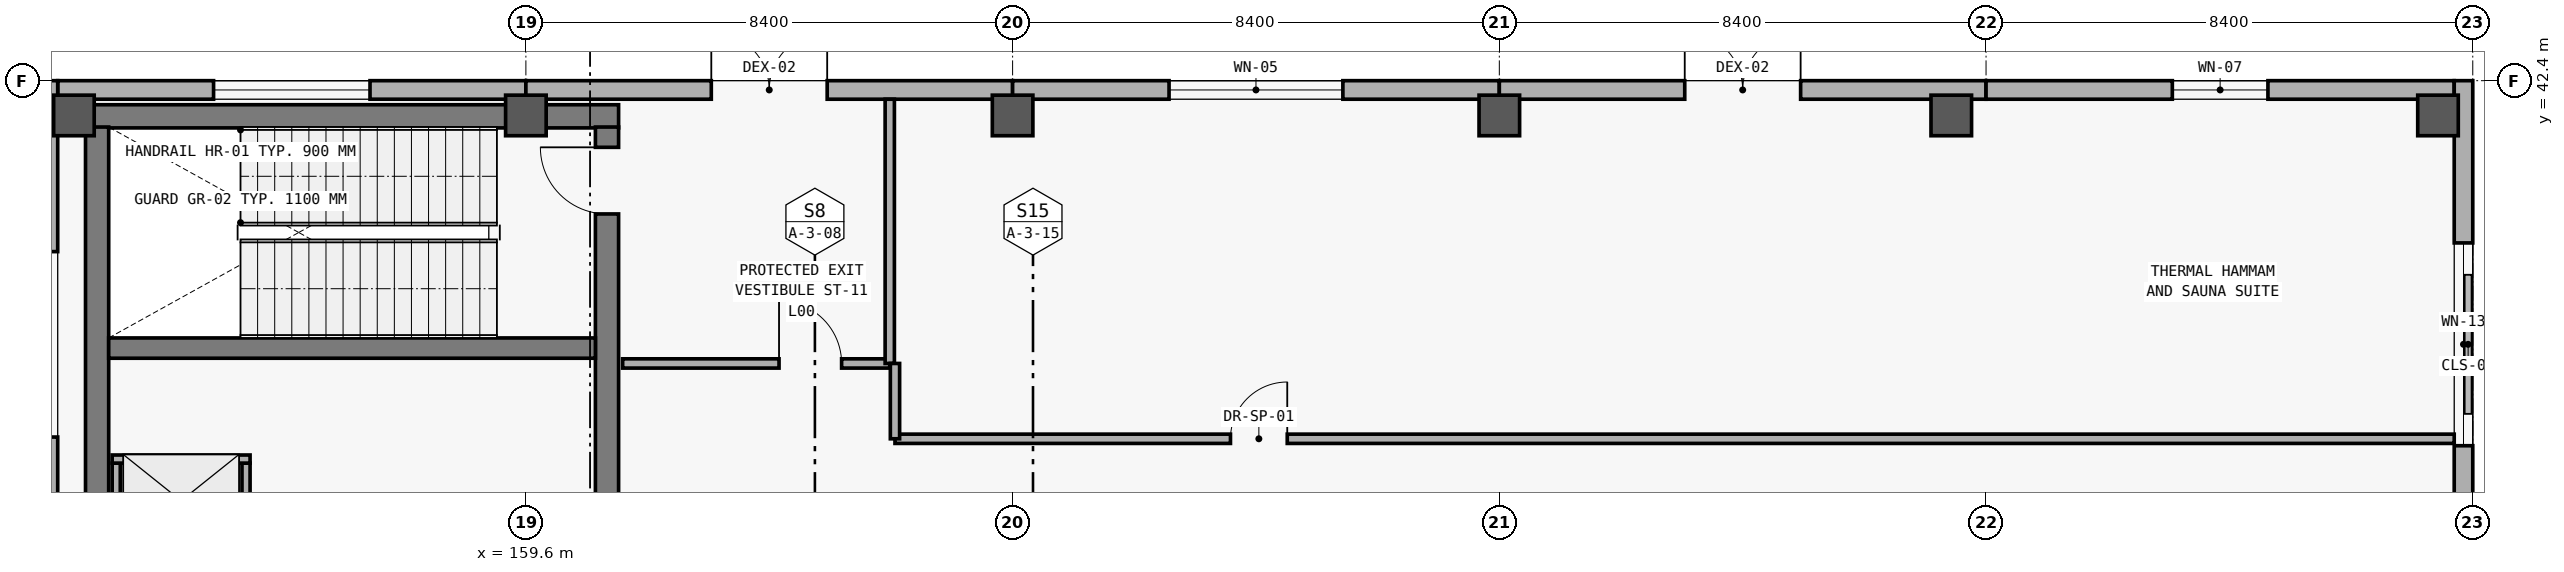
"""IFC4 building model, lengths in metres.
Left out: names, types, materials, properties, quantities, classifications, styles, units other than length and angle.
Written with IfcOpenShell. Run it as: python <this file> out.ifc"""

import sys

from ifc_helpers import new_model, si_unit, direction, frame, frame_2d, origin, origin_2d, place, context, subcontext, project, spatial, rectangle, extrude, element, fill, save


model = new_model("IFC4")
c1 = context("Model", 3, precision=1e-05, world=origin(), true_north=direction((0.0, 1.0)))
c2 = subcontext(c1, "Body", "Model", "MODEL_VIEW")
j1 = project(units=[si_unit("LENGTHUNIT", "METRE"), si_unit("PLANEANGLEUNIT", "RADIAN")], contexts=[c1])
p1 = place(None, origin())
s1 = spatial("IfcSite", under=j1, at=p1, CompositionType="ELEMENT")
p2 = place(p1, origin())
s2 = spatial("IfcBuilding", under=s1, at=p2, CompositionType="ELEMENT")
p3 = place(p2, origin())
s3 = spatial("IfcBuildingStorey", under=s2, at=p3, CompositionType="ELEMENT", Elevation=0.0)
for number, where, z_axis, x_axis in (
    (1, (151.8, 41.8, 0.0), (0.0, 0.0, 1.0), (1.0, 0.0, 0.0)),
    (2, (159.6, 41.8, 0.0), (0.0, 0.0, 1.0), (1.0, 0.0, 0.0)),
    (3, (168.0, 41.8, 0.0), (0.0, 0.0, 1.0), (1.0, 0.0, 0.0)),
    (4, (176.4, 41.8, 0.0), (0.0, 0.0, 1.0), (1.0, 0.0, 0.0)),
    (5, (184.2, 41.8, 0.0), (0.0, 0.0, 1.0), (1.0, 0.0, 0.0)),
    (6, (192.6, 41.8, 0.0), (0.0, 0.0, 1.0), (1.0, 0.0, 0.0)),
):
    element("IfcColumn", number, at=place(p3, frame(where, z_axis=z_axis, x_axis=x_axis)), inside=s3, PredefinedType="COLUMN", context=c2, shape_type="SweptSolid", body=[
        extrude(rectangle(XDim=0.7, YDim=0.7, at=origin_2d()), origin(), (0.0, 0.0, 1.0), 5.4),
    ])
p4 = place(p3, frame((151.52, 42.24, 0.0), z_axis=(0.0, 0.0, 1.0), x_axis=(1.0, 0.0, 0.0)))
e7 = element("IfcWall", 7, at=p4, inside=s3, PredefinedType="SOLIDWALL", context=c2, shape_type="SweptSolid", body=[
    extrude(rectangle(XDim=8.08, YDim=0.32, at=frame_2d((4.04, 0.0))), origin(), (0.0, 0.0, 1.0), 5.1),
])
p5 = place(p4, frame((2.69, 0.0, 0.9)))
e8 = element("IfcOpeningElement", 8, at=p5, cuts=e7, PredefinedType="OPENING", context=c2, shape_type="SweptSolid", body=[
    extrude(rectangle(XDim=2.7, YDim=1.85, at=frame_2d((1.35, 0.925))), frame((0.0, 0.17, 0.0), z_axis=(0.0, -1.0, 0.0), x_axis=(1.0, 0.0, 0.0)), (0.0, 0.0, 1.0), 0.34),
])
p6 = place(p3, frame((159.6, 42.24, 0.0), z_axis=(0.0, 0.0, 1.0), x_axis=(1.0, 0.0, 0.0)))
e9 = element("IfcWall", 9, at=p6, inside=s3, PredefinedType="SOLIDWALL", context=c2, shape_type="SweptSolid", body=[
    extrude(rectangle(XDim=8.4, YDim=0.32, at=frame_2d((4.2, 0.0))), origin(), (0.0, 0.0, 1.0), 5.1),
])
p7 = place(p6, frame((3.2, 0.0, 0.0)))
e10 = element("IfcOpeningElement", 10, at=p7, cuts=e9, PredefinedType="OPENING", context=c2, shape_type="SweptSolid", body=[
    extrude(rectangle(XDim=2.0, YDim=2.6, at=frame_2d((1.0, 1.3))), frame((0.0, 0.17, 0.0), z_axis=(0.0, -1.0, 0.0), x_axis=(1.0, 0.0, 0.0)), (0.0, 0.0, 1.0), 0.34),
])
p8 = place(p3, frame((168.0, 42.24, 0.0), z_axis=(0.0, 0.0, 1.0), x_axis=(1.0, 0.0, 0.0)))
e11 = element("IfcWall", 11, at=p8, inside=s3, PredefinedType="SOLIDWALL", context=c2, shape_type="SweptSolid", body=[
    extrude(rectangle(XDim=8.4, YDim=0.32, at=frame_2d((4.2, 0.0))), origin(), (0.0, 0.0, 1.0), 5.1),
])
p9 = place(p8, frame((2.7, 0.0, 0.9)))
e12 = element("IfcOpeningElement", 12, at=p9, cuts=e11, PredefinedType="OPENING", context=c2, shape_type="SweptSolid", body=[
    extrude(rectangle(XDim=3.0, YDim=1.9, at=frame_2d((1.5, 0.95))), frame((0.0, 0.17, 0.0), z_axis=(0.0, -1.0, 0.0), x_axis=(1.0, 0.0, 0.0)), (0.0, 0.0, 1.0), 0.34),
])
p10 = place(p3, frame((176.4, 42.24, 0.0), z_axis=(0.0, 0.0, 1.0), x_axis=(1.0, 0.0, 0.0)))
e13 = element("IfcWall", 13, at=p10, inside=s3, PredefinedType="SOLIDWALL", context=c2, shape_type="SweptSolid", body=[
    extrude(rectangle(XDim=8.4, YDim=0.32, at=frame_2d((4.2, 0.0))), origin(), (0.0, 0.0, 1.0), 5.1),
])
p11 = place(p10, frame((3.2, 0.0, 0.0)))
e14 = element("IfcOpeningElement", 14, at=p11, cuts=e13, PredefinedType="OPENING", context=c2, shape_type="SweptSolid", body=[
    extrude(rectangle(XDim=2.0, YDim=2.6, at=frame_2d((1.0, 1.3))), frame((0.0, 0.17, 0.0), z_axis=(0.0, -1.0, 0.0), x_axis=(1.0, 0.0, 0.0)), (0.0, 0.0, 1.0), 0.34),
])
p12 = place(p3, frame((184.8, 42.24, 0.0), z_axis=(0.0, 0.0, 1.0), x_axis=(1.0, 0.0, 0.0)))
e15 = element("IfcWall", 15, at=p12, inside=s3, PredefinedType="SOLIDWALL", context=c2, shape_type="SweptSolid", body=[
    extrude(rectangle(XDim=8.08, YDim=0.32, at=frame_2d((4.04, 0.0))), origin(), (0.0, 0.0, 1.0), 5.1),
])
p13 = place(p12, frame((3.215, 0.0, 0.9)))
e16 = element("IfcOpeningElement", 16, at=p13, cuts=e15, PredefinedType="OPENING", context=c2, shape_type="SweptSolid", body=[
    extrude(rectangle(XDim=1.65, YDim=1.75, at=frame_2d((0.825, 0.875))), frame((0.0, 0.17, 0.0), z_axis=(0.0, -1.0, 0.0), x_axis=(1.0, 0.0, 0.0)), (0.0, 0.0, 1.0), 0.34),
])
p14 = place(p3, frame((151.36, 33.3, 0.0), z_axis=(0.0, 0.0, 1.0), x_axis=(0.0, 1.0, 0.0)))
e17 = element("IfcWall", 17, at=p14, inside=s3, PredefinedType="SOLIDWALL", context=c2, shape_type="SweptSolid", body=[
    extrude(rectangle(XDim=9.1, YDim=0.32, at=frame_2d((4.55, 0.0))), origin(), (0.0, 0.0, 1.0), 5.1),
])
p15 = place(p14, frame((2.95, 0.0, 0.9)))
e18 = element("IfcOpeningElement", 18, at=p15, cuts=e17, PredefinedType="OPENING", context=c2, shape_type="SweptSolid", body=[
    extrude(rectangle(XDim=3.2, YDim=1.95, at=frame_2d((1.6, 0.975))), frame((0.0, 0.17, 0.0), z_axis=(0.0, -1.0, 0.0), x_axis=(1.0, 0.0, 0.0)), (0.0, 0.0, 1.0), 0.34),
])
p16 = place(p3, frame((193.04, 42.4, 0.0), z_axis=(0.0, 0.0, 1.0), x_axis=(0.0, -1.0, 0.0)))
e19 = element("IfcWall", 19, at=p16, inside=s3, PredefinedType="SOLIDWALL", context=c2, shape_type="SweptSolid", body=[
    extrude(rectangle(XDim=9.1, YDim=0.32, at=frame_2d((4.55, 0.0))), origin(), (0.0, 0.0, 1.0), 5.1),
])
p17 = place(p16, frame((2.8, 0.0, 0.9)))
e20 = element("IfcOpeningElement", 20, at=p17, cuts=e19, PredefinedType="OPENING", context=c2, shape_type="SweptSolid", body=[
    extrude(rectangle(XDim=3.5, YDim=2.0, at=frame_2d((1.75, 1.0))), frame((0.0, 0.17, 0.0), z_axis=(0.0, -1.0, 0.0), x_axis=(1.0, 0.0, 0.0)), (0.0, 0.0, 1.0), 0.34),
])
p18 = place(p3, frame((161.2, 41.785, 0.0), z_axis=(0.0, 0.0, 1.0), x_axis=(-1.0, 0.0, 0.0)))
e21 = element("IfcWall", 21, at=p18, inside=s3, PredefinedType="SHEAR", context=c2, shape_type="SweptSolid", body=[
    extrude(rectangle(XDim=9.2, YDim=0.4, at=frame_2d((4.6, 0.0))), origin(), (0.0, 0.0, 1.0), 5.08),
])
p19 = place(p3, frame((152.2, 41.6, 0.0), z_axis=(0.0, 0.0, 1.0), x_axis=(0.0, -1.0, 0.0)))
e22 = element("IfcWall", 22, at=p19, inside=s3, PredefinedType="SHEAR", context=c2, shape_type="SweptSolid", body=[
    extrude(rectangle(XDim=7.4, YDim=0.4, at=frame_2d((3.7, 0.0))), origin(), (0.0, 0.0, 1.0), 5.08),
])
p20 = place(p3, frame((161.0, 34.2, 0.0), z_axis=(0.0, 0.0, 1.0), x_axis=(0.0, 1.0, 0.0)))
e23 = element("IfcWall", 23, at=p20, inside=s3, PredefinedType="SHEAR", context=c2, shape_type="SweptSolid", body=[
    extrude(rectangle(XDim=7.4, YDim=0.4, at=frame_2d((3.7, 0.0))), origin(), (0.0, 0.0, 1.0), 5.08),
])
p21 = place(p20, frame((5.9, 0.0, 0.0)))
e24 = element("IfcOpeningElement", 24, at=p21, cuts=e23, PredefinedType="OPENING", context=c2, shape_type="SweptSolid", body=[
    extrude(rectangle(XDim=1.15, YDim=2.2, at=frame_2d((0.575, 1.1))), frame((0.0, 0.21, 0.0), z_axis=(0.0, -1.0, 0.0), x_axis=(1.0, 0.0, 0.0)), (0.0, 0.0, 1.0), 0.42),
])
p22 = place(p3, frame((152.4, 37.785, 0.0), z_axis=(0.0, 0.0, 1.0), x_axis=(1.0, 0.0, 0.0)))
e25 = element("IfcWall", 25, at=p22, inside=s3, PredefinedType="SHEAR", context=c2, shape_type="SweptSolid", body=[
    extrude(rectangle(XDim=8.4, YDim=0.35, at=frame_2d((4.2, 0.0))), origin(), (0.0, 0.0, 1.0), 5.08),
])
for number, where, z_axis, x_axis in (
    (26, (152.53, 34.2, 0.0), (0.0, 0.0, 1.0), (0.0, 1.0, 0.0)),
    (27, (154.77, 34.2, 0.0), (0.0, 0.0, 1.0), (0.0, 1.0, 0.0)),
):
    element("IfcWall", number, at=place(p3, frame(where, z_axis=z_axis, x_axis=x_axis)), inside=s3, PredefinedType="PARTITIONING", context=c2, shape_type="SweptSolid", body=[
        extrude(rectangle(XDim=1.6, YDim=0.14, at=frame_2d((0.8, 0.0))), origin(), (0.0, 0.0, 1.0), 4.23),
    ])
p23 = place(p3, frame((152.46, 35.87, 0.0), z_axis=(0.0, 0.0, 1.0), x_axis=(1.0, 0.0, 0.0)))
e28 = element("IfcWall", 28, at=p23, inside=s3, PredefinedType="PARTITIONING", context=c2, shape_type="SweptSolid", body=[
    extrude(rectangle(XDim=2.38, YDim=0.14, at=frame_2d((1.19, 0.0))), origin(), (0.0, 0.0, 1.0), 4.23),
])
p24 = place(p3, frame((161.27, 37.52, 0.0), z_axis=(0.0, 0.0, 1.0), x_axis=(1.0, 0.0, 0.0)))
e29 = element("IfcWall", 29, at=p24, inside=s3, PredefinedType="PARTITIONING", context=c2, shape_type="SweptSolid", body=[
    extrude(rectangle(XDim=4.61, YDim=0.16, at=frame_2d((2.305, 0.0))), origin(), (0.0, 0.0, 1.0), 4.18),
])
p25 = place(p24, frame((2.699, 0.0, 0.0)))
e30 = element("IfcOpeningElement", 30, at=p25, cuts=e29, PredefinedType="OPENING", context=c2, shape_type="SweptSolid", body=[
    extrude(rectangle(XDim=1.08, YDim=2.25, at=frame_2d((0.54, 1.125))), frame((0.0, 0.09, 0.0), z_axis=(0.0, -1.0, 0.0), x_axis=(1.0, 0.0, 0.0)), (0.0, 0.0, 1.0), 0.18),
])
p26 = place(p3, frame((165.97, 36.22, 0.0), z_axis=(0.0, 0.0, 1.0), x_axis=(1.0, 0.0, 0.0)))
e31 = element("IfcWall", 31, at=p26, inside=s3, PredefinedType="PARTITIONING", context=c2, shape_type="SweptSolid", body=[
    extrude(rectangle(XDim=26.91, YDim=0.16, at=frame_2d((13.455, 0.0))), origin(), (0.0, 0.0, 1.0), 4.18),
])
p27 = place(p26, frame((5.79, 0.0, 0.0)))
e32 = element("IfcOpeningElement", 32, at=p27, cuts=e31, PredefinedType="OPENING", context=c2, shape_type="SweptSolid", body=[
    extrude(rectangle(XDim=0.98, YDim=2.2, at=frame_2d((0.49, 1.1))), frame((0.0, 0.09, 0.0), z_axis=(0.0, -1.0, 0.0), x_axis=(1.0, 0.0, 0.0)), (0.0, 0.0, 1.0), 0.18),
])
p28 = place(p3, frame((165.88, 37.52, 0.0), z_axis=(0.0, 0.0, 1.0), x_axis=(0.0, 1.0, 0.0)))
e33 = element("IfcWall", 33, at=p28, inside=s3, PredefinedType="PARTITIONING", context=c2, shape_type="SweptSolid", body=[
    extrude(rectangle(XDim=4.56, YDim=0.16, at=frame_2d((2.28, 0.0))), origin(), (0.0, 0.0, 1.0), 4.18),
])
p29 = place(p3, frame((165.97, 36.22, 0.0), z_axis=(0.0, 0.0, 1.0), x_axis=(0.0, 1.0, 0.0)))
e34 = element("IfcWall", 34, at=p29, inside=s3, PredefinedType="PARTITIONING", context=c2, shape_type="SweptSolid", body=[
    extrude(rectangle(XDim=1.3, YDim=0.16, at=frame_2d((0.65, 0.0))), origin(), (0.0, 0.0, 1.0), 4.18),
])
p30 = place(p5, origin())
e35 = element("IfcWindow", 35, at=p30, inside=s3, PartitioningType="SINGLE_PANEL", PredefinedType="WINDOW", context=c2, shape_type="SweptSolid", body=[
    extrude(rectangle(XDim=2.7, YDim=1.85, at=frame_2d((1.35, 0.925))), frame((0.0, 0.03, 0.0), z_axis=(0.0, -1.0, 0.0), x_axis=(1.0, 0.0, 0.0)), (0.0, 0.0, 1.0), 0.06),
])
fill(e8, e35)
p31 = place(p7, origin())
e36 = element("IfcDoor", 36, at=p31, inside=s3, OperationType="DOUBLE_DOOR_SINGLE_SWING", PredefinedType="DOOR", context=c2, shape_type="SweptSolid", body=[
    extrude(rectangle(XDim=2.0, YDim=2.6, at=frame_2d((1.0, 1.3))), frame((0.0, 0.025, 0.0), z_axis=(0.0, -1.0, 0.0), x_axis=(1.0, 0.0, 0.0)), (0.0, 0.0, 1.0), 0.05),
])
fill(e10, e36)
p32 = place(p9, origin())
e37 = element("IfcWindow", 37, at=p32, inside=s3, PartitioningType="SINGLE_PANEL", PredefinedType="WINDOW", context=c2, shape_type="SweptSolid", body=[
    extrude(rectangle(XDim=3.0, YDim=1.9, at=frame_2d((1.5, 0.95))), frame((0.0, 0.03, 0.0), z_axis=(0.0, -1.0, 0.0), x_axis=(1.0, 0.0, 0.0)), (0.0, 0.0, 1.0), 0.06),
])
fill(e12, e37)
p33 = place(p11, origin())
e38 = element("IfcDoor", 38, at=p33, inside=s3, OperationType="DOUBLE_DOOR_SINGLE_SWING", PredefinedType="DOOR", context=c2, shape_type="SweptSolid", body=[
    extrude(rectangle(XDim=2.0, YDim=2.6, at=frame_2d((1.0, 1.3))), frame((0.0, 0.025, 0.0), z_axis=(0.0, -1.0, 0.0), x_axis=(1.0, 0.0, 0.0)), (0.0, 0.0, 1.0), 0.05),
])
fill(e14, e38)
p34 = place(p13, origin())
e39 = element("IfcWindow", 39, at=p34, inside=s3, PartitioningType="SINGLE_PANEL", PredefinedType="WINDOW", context=c2, shape_type="SweptSolid", body=[
    extrude(rectangle(XDim=1.65, YDim=1.75, at=frame_2d((0.825, 0.875))), frame((0.0, 0.03, 0.0), z_axis=(0.0, -1.0, 0.0), x_axis=(1.0, 0.0, 0.0)), (0.0, 0.0, 1.0), 0.06),
])
fill(e16, e39)
p35 = place(p17, origin())
e40 = element("IfcWindow", 40, at=p35, inside=s3, PartitioningType="SINGLE_PANEL", PredefinedType="WINDOW", context=c2, shape_type="SweptSolid", body=[
    extrude(rectangle(XDim=3.5, YDim=2.0, at=frame_2d((1.75, 1.0))), frame((0.0, 0.03, 0.0), z_axis=(0.0, -1.0, 0.0), x_axis=(1.0, 0.0, 0.0)), (0.0, 0.0, 1.0), 0.06),
])
fill(e20, e40)
p36 = place(p21, origin())
e41 = element("IfcDoor", 41, at=p36, inside=s3, OperationType="SINGLE_SWING_RIGHT", PredefinedType="DOOR", context=c2, shape_type="SweptSolid", body=[
    extrude(rectangle(XDim=1.15, YDim=2.2, at=frame_2d((0.575, 1.1))), frame((0.0, 0.025, 0.0), z_axis=(0.0, -1.0, 0.0), x_axis=(1.0, 0.0, 0.0)), (0.0, 0.0, 1.0), 0.05),
])
fill(e24, e41)
p37 = place(p25, origin())
e42 = element("IfcDoor", 42, at=p37, inside=s3, OperationType="SINGLE_SWING_LEFT", PredefinedType="DOOR", context=c2, shape_type="SweptSolid", body=[
    extrude(rectangle(XDim=1.08, YDim=2.25, at=frame_2d((0.54, 1.125))), frame((0.0, 0.025, 0.0), z_axis=(0.0, -1.0, 0.0), x_axis=(1.0, 0.0, 0.0)), (0.0, 0.0, 1.0), 0.05),
])
fill(e30, e42)
p38 = place(p27, origin())
e43 = element("IfcDoor", 43, at=p38, inside=s3, OperationType="SINGLE_SWING_RIGHT", PredefinedType="DOOR", context=c2, shape_type="SweptSolid", body=[
    extrude(rectangle(XDim=0.98, YDim=2.2, at=frame_2d((0.49, 1.1))), frame((0.0, 0.025, 0.0), z_axis=(0.0, -1.0, 0.0), x_axis=(1.0, 0.0, 0.0)), (0.0, 0.0, 1.0), 0.05),
])
fill(e32, e43)
save(model, sys.argv[1])
